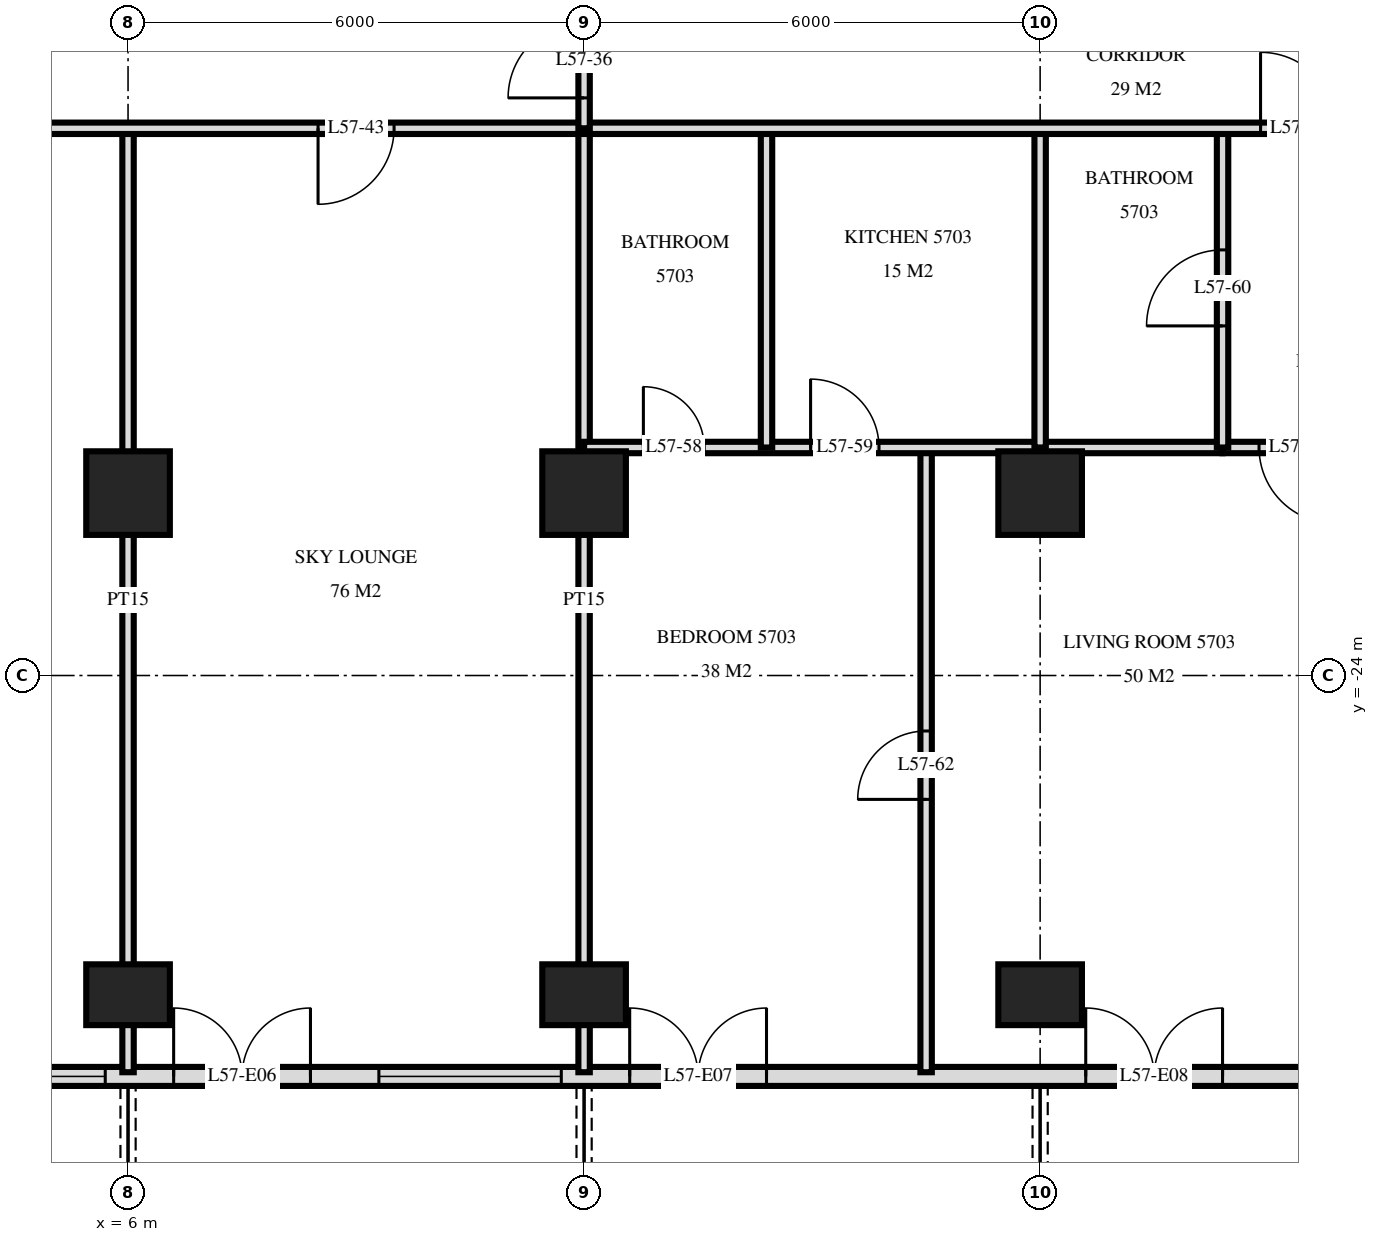
"""IFC4 building model, lengths in metres.
Left out: names, types, materials, properties, quantities, classifications, styles, units other than length and angle.
Written with IfcOpenShell. Run it as: python <this file> out.ifc"""

import sys

from ifc_helpers import new_model, si_unit, direction, frame, frame_2d, origin, origin_2d, place, context, subcontext, project, spatial, rectangle, extrude, element, fill, save


model = new_model("IFC4")
c1 = context("Model", 3, precision=1e-05, world=origin(), true_north=direction((0.0, 1.0)))
c2 = subcontext(c1, "Body", "Model", "MODEL_VIEW")
j1 = project(units=[si_unit("LENGTHUNIT", "METRE"), si_unit("PLANEANGLEUNIT", "RADIAN")], contexts=[c1])
p1 = place(None, origin())
s1 = spatial("IfcSite", under=j1, at=p1, CompositionType="ELEMENT")
p2 = place(p1, origin())
s2 = spatial("IfcBuilding", under=s1, at=p2, CompositionType="ELEMENT")
p3 = place(p2, frame((0.0, 0.0, 218.6)))
s3 = spatial("IfcBuildingStorey", under=s2, at=p3, CompositionType="ELEMENT", Elevation=218.6)
p4 = place(p3, frame((6.0, -28.2, 0.0), z_axis=(0.0, 0.0, 1.0), x_axis=(1.0, 0.0, 0.0)))
e1 = element("IfcColumn", 1, at=p4, inside=s3, PredefinedType="COLUMN", context=c2, shape_type="SweptSolid", body=[
    extrude(rectangle(XDim=1.1, YDim=0.8, at=origin_2d()), origin(), (0.0, 0.0, 1.0), 3.5),
])
p5 = place(p3, frame((6.0, -21.6, 0.0), z_axis=(0.0, 0.0, 1.0), x_axis=(1.0, 0.0, 0.0)))
e2 = element("IfcColumn", 2, at=p5, inside=s3, PredefinedType="COLUMN", context=c2, shape_type="SweptSolid", body=[
    extrude(rectangle(XDim=1.1, YDim=1.1, at=origin_2d()), origin(), (0.0, 0.0, 1.0), 3.5),
])
p6 = place(p3, frame((12.0, -28.2, 0.0), z_axis=(0.0, 0.0, 1.0), x_axis=(1.0, 0.0, 0.0)))
e3 = element("IfcColumn", 3, at=p6, inside=s3, PredefinedType="COLUMN", context=c2, shape_type="SweptSolid", body=[
    extrude(rectangle(XDim=1.1, YDim=0.8, at=origin_2d()), origin(), (0.0, 0.0, 1.0), 3.5),
])
p7 = place(p3, frame((12.0, -21.6, 0.0), z_axis=(0.0, 0.0, 1.0), x_axis=(1.0, 0.0, 0.0)))
e4 = element("IfcColumn", 4, at=p7, inside=s3, PredefinedType="COLUMN", context=c2, shape_type="SweptSolid", body=[
    extrude(rectangle(XDim=1.1, YDim=1.1, at=origin_2d()), origin(), (0.0, 0.0, 1.0), 3.5),
])
p8 = place(p3, frame((18.0, -28.2, 0.0), z_axis=(0.0, 0.0, 1.0), x_axis=(1.0, 0.0, 0.0)))
e5 = element("IfcColumn", 5, at=p8, inside=s3, PredefinedType="COLUMN", context=c2, shape_type="SweptSolid", body=[
    extrude(rectangle(XDim=1.1, YDim=0.8, at=origin_2d()), origin(), (0.0, 0.0, 1.0), 3.5),
])
p9 = place(p3, frame((18.0, -21.6, 0.0), z_axis=(0.0, 0.0, 1.0), x_axis=(1.0, 0.0, 0.0)))
e6 = element("IfcColumn", 6, at=p9, inside=s3, PredefinedType="COLUMN", context=c2, shape_type="SweptSolid", body=[
    extrude(rectangle(XDim=1.1, YDim=1.1, at=origin_2d()), origin(), (0.0, 0.0, 1.0), 3.5),
])
p10 = place(p3, frame((-22.475, -29.275, 0.0), z_axis=(0.0, 0.0, 1.0), x_axis=(1.0, 0.0, 0.0)))
e7 = element("IfcWall", 7, at=p10, inside=s3, PredefinedType="SOLIDWALL", context=c2, shape_type="SweptSolid", body=[
    extrude(rectangle(XDim=44.951, YDim=0.25, at=frame_2d((22.475, 0.0))), origin(), (0.0, 0.0, 1.0), 3.22),
])
p11 = place(p10, frame((0.575, 0.0, 0.0)))
e8 = element("IfcOpeningElement", 8, at=p11, cuts=e7, PredefinedType="OPENING", context=c2, shape_type="SweptSolid", body=[
    extrude(rectangle(XDim=1.8, YDim=2.4, at=frame_2d((0.9, 1.2))), frame((0.0, 0.135, 0.0), z_axis=(0.0, -1.0, 0.0), x_axis=(1.0, 0.0, 0.0)), (0.0, 0.0, 1.0), 0.27),
])
p12 = place(p10, frame((4.775, 0.0, 0.9)))
e9 = element("IfcOpeningElement", 9, at=p12, cuts=e7, PredefinedType="OPENING", context=c2, shape_type="SweptSolid", body=[
    extrude(rectangle(XDim=2.4, YDim=1.5, at=frame_2d((1.2, 0.75))), frame((0.0, 0.135, 0.0), z_axis=(0.0, -1.0, 0.0), x_axis=(1.0, 0.0, 0.0)), (0.0, 0.0, 1.0), 0.27),
])
p13 = place(p10, frame((8.075, 0.0, 0.0)))
e10 = element("IfcOpeningElement", 10, at=p13, cuts=e7, PredefinedType="OPENING", context=c2, shape_type="SweptSolid", body=[
    extrude(rectangle(XDim=1.8, YDim=2.4, at=frame_2d((0.9, 1.2))), frame((0.0, 0.135, 0.0), z_axis=(0.0, -1.0, 0.0), x_axis=(1.0, 0.0, 0.0)), (0.0, 0.0, 1.0), 0.27),
])
p14 = place(p10, frame((11.075, 0.0, 0.0)))
e11 = element("IfcOpeningElement", 11, at=p14, cuts=e7, PredefinedType="OPENING", context=c2, shape_type="SweptSolid", body=[
    extrude(rectangle(XDim=1.8, YDim=2.4, at=frame_2d((0.9, 1.2))), frame((0.0, 0.135, 0.0), z_axis=(0.0, -1.0, 0.0), x_axis=(1.0, 0.0, 0.0)), (0.0, 0.0, 1.0), 0.27),
])
p15 = place(p10, frame((13.775, 0.0, 0.9)))
e12 = element("IfcOpeningElement", 12, at=p15, cuts=e7, PredefinedType="OPENING", context=c2, shape_type="SweptSolid", body=[
    extrude(rectangle(XDim=2.4, YDim=1.5, at=frame_2d((1.2, 0.75))), frame((0.0, 0.135, 0.0), z_axis=(0.0, -1.0, 0.0), x_axis=(1.0, 0.0, 0.0)), (0.0, 0.0, 1.0), 0.27),
])
p16 = place(p10, frame((16.775, 0.0, 0.9)))
e13 = element("IfcOpeningElement", 13, at=p16, cuts=e7, PredefinedType="OPENING", context=c2, shape_type="SweptSolid", body=[
    extrude(rectangle(XDim=2.4, YDim=1.5, at=frame_2d((1.2, 0.75))), frame((0.0, 0.135, 0.0), z_axis=(0.0, -1.0, 0.0), x_axis=(1.0, 0.0, 0.0)), (0.0, 0.0, 1.0), 0.27),
])
p17 = place(p10, frame((20.075, 0.0, 0.0)))
e14 = element("IfcOpeningElement", 14, at=p17, cuts=e7, PredefinedType="OPENING", context=c2, shape_type="SweptSolid", body=[
    extrude(rectangle(XDim=1.8, YDim=2.4, at=frame_2d((0.9, 1.2))), frame((0.0, 0.135, 0.0), z_axis=(0.0, -1.0, 0.0), x_axis=(1.0, 0.0, 0.0)), (0.0, 0.0, 1.0), 0.27),
])
p18 = place(p10, frame((23.075, 0.0, 0.0)))
e15 = element("IfcOpeningElement", 15, at=p18, cuts=e7, PredefinedType="OPENING", context=c2, shape_type="SweptSolid", body=[
    extrude(rectangle(XDim=1.8, YDim=2.4, at=frame_2d((0.9, 1.2))), frame((0.0, 0.135, 0.0), z_axis=(0.0, -1.0, 0.0), x_axis=(1.0, 0.0, 0.0)), (0.0, 0.0, 1.0), 0.27),
])
p19 = place(p10, frame((25.775, 0.0, 0.9)))
e16 = element("IfcOpeningElement", 16, at=p19, cuts=e7, PredefinedType="OPENING", context=c2, shape_type="SweptSolid", body=[
    extrude(rectangle(XDim=2.4, YDim=1.5, at=frame_2d((1.2, 0.75))), frame((0.0, 0.135, 0.0), z_axis=(0.0, -1.0, 0.0), x_axis=(1.0, 0.0, 0.0)), (0.0, 0.0, 1.0), 0.27),
])
p20 = place(p10, frame((29.075, 0.0, 0.0)))
e17 = element("IfcOpeningElement", 17, at=p20, cuts=e7, PredefinedType="OPENING", context=c2, shape_type="SweptSolid", body=[
    extrude(rectangle(XDim=1.8, YDim=2.4, at=frame_2d((0.9, 1.2))), frame((0.0, 0.135, 0.0), z_axis=(0.0, -1.0, 0.0), x_axis=(1.0, 0.0, 0.0)), (0.0, 0.0, 1.0), 0.27),
])
p21 = place(p10, frame((31.775, 0.0, 0.9)))
e18 = element("IfcOpeningElement", 18, at=p21, cuts=e7, PredefinedType="OPENING", context=c2, shape_type="SweptSolid", body=[
    extrude(rectangle(XDim=2.4, YDim=1.5, at=frame_2d((1.2, 0.75))), frame((0.0, 0.135, 0.0), z_axis=(0.0, -1.0, 0.0), x_axis=(1.0, 0.0, 0.0)), (0.0, 0.0, 1.0), 0.27),
])
p22 = place(p10, frame((35.075, 0.0, 0.0)))
e19 = element("IfcOpeningElement", 19, at=p22, cuts=e7, PredefinedType="OPENING", context=c2, shape_type="SweptSolid", body=[
    extrude(rectangle(XDim=1.8, YDim=2.4, at=frame_2d((0.9, 1.2))), frame((0.0, 0.135, 0.0), z_axis=(0.0, -1.0, 0.0), x_axis=(1.0, 0.0, 0.0)), (0.0, 0.0, 1.0), 0.27),
])
p23 = place(p10, frame((41.075, 0.0, 0.0)))
e20 = element("IfcOpeningElement", 20, at=p23, cuts=e7, PredefinedType="OPENING", context=c2, shape_type="SweptSolid", body=[
    extrude(rectangle(XDim=1.8, YDim=2.4, at=frame_2d((0.9, 1.2))), frame((0.0, 0.135, 0.0), z_axis=(0.0, -1.0, 0.0), x_axis=(1.0, 0.0, 0.0)), (0.0, 0.0, 1.0), 0.27),
])
p24 = place(p3, frame((20.4, -21.0, 0.0), z_axis=(0.0, 0.0, 1.0), x_axis=(0.0, 1.0, 0.0)))
e21 = element("IfcWall", 21, at=p24, inside=s3, PredefinedType="PARTITIONING", context=c2, shape_type="SweptSolid", body=[
    extrude(rectangle(XDim=4.2, YDim=0.15, at=frame_2d((2.1, 0.0))), origin(), (0.0, 0.0, 1.0), 3.22),
])
p25 = place(p24, frame((1.6, 0.0, 0.0)))
e22 = element("IfcOpeningElement", 22, at=p25, cuts=e21, PredefinedType="OPENING", context=c2, shape_type="SweptSolid", body=[
    extrude(rectangle(XDim=1.0, YDim=2.1, at=frame_2d((0.5, 1.05))), frame((0.0, 0.085, 0.0), z_axis=(0.0, -1.0, 0.0), x_axis=(1.0, 0.0, 0.0)), (0.0, 0.0, 1.0), 0.17),
])
p26 = place(p3, frame((18.0, -21.0, 0.0), z_axis=(0.0, 0.0, 1.0), x_axis=(0.0, 1.0, 0.0)))
e23 = element("IfcWall", 23, at=p26, inside=s3, PredefinedType="PARTITIONING", context=c2, shape_type="SweptSolid", body=[
    extrude(rectangle(XDim=4.2, YDim=0.15, at=frame_2d((2.1, 0.0))), origin(), (0.0, 0.0, 1.0), 3.22),
])
p27 = place(p3, frame((16.5, -29.22, 0.0), z_axis=(0.0, 0.0, 1.0), x_axis=(0.0, 1.0, 0.0)))
e24 = element("IfcWall", 24, at=p27, inside=s3, PredefinedType="PARTITIONING", context=c2, shape_type="SweptSolid", body=[
    extrude(rectangle(XDim=8.22, YDim=0.15, at=frame_2d((4.11, 0.0))), origin(), (0.0, 0.0, 1.0), 3.22),
])
p28 = place(p27, frame((3.59, 0.0, 0.0)))
e25 = element("IfcOpeningElement", 25, at=p28, cuts=e24, PredefinedType="OPENING", context=c2, shape_type="SweptSolid", body=[
    extrude(rectangle(XDim=0.9, YDim=2.1, at=frame_2d((0.45, 1.05))), frame((0.0, 0.085, 0.0), z_axis=(0.0, -1.0, 0.0), x_axis=(1.0, 0.0, 0.0)), (0.0, 0.0, 1.0), 0.17),
])
p29 = place(p3, frame((14.4, -21.0, 0.0), z_axis=(0.0, 0.0, 1.0), x_axis=(0.0, 1.0, 0.0)))
e26 = element("IfcWall", 26, at=p29, inside=s3, PredefinedType="PARTITIONING", context=c2, shape_type="SweptSolid", body=[
    extrude(rectangle(XDim=4.2, YDim=0.15, at=frame_2d((2.1, 0.0))), origin(), (0.0, 0.0, 1.0), 3.22),
])
p30 = place(p3, frame((12.0, -16.8, 0.0), z_axis=(0.0, 0.0, 1.0), x_axis=(0.0, 1.0, 0.0)))
e27 = element("IfcWall", 27, at=p30, inside=s3, PredefinedType="PARTITIONING", context=c2, shape_type="SweptSolid", body=[
    extrude(rectangle(XDim=1.75, YDim=0.15, at=frame_2d((0.875, 0.0))), origin(), (0.0, 0.0, 1.0), 3.22),
])
p31 = place(p30, frame((0.4, 0.0, 0.0)))
e28 = element("IfcOpeningElement", 28, at=p31, cuts=e27, PredefinedType="OPENING", context=c2, shape_type="SweptSolid", body=[
    extrude(rectangle(XDim=1.0, YDim=2.1, at=frame_2d((0.5, 1.05))), frame((0.0, 0.085, 0.0), z_axis=(0.0, -1.0, 0.0), x_axis=(1.0, 0.0, 0.0)), (0.0, 0.0, 1.0), 0.17),
])
for number, where, z_axis, x_axis in (
    (29, (12.0, -29.22, 0.0), (0.0, 0.0, 1.0), (0.0, 1.0, 0.0)),
    (30, (6.0, -29.22, 0.0), (0.0, 0.0, 1.0), (0.0, 1.0, 0.0)),
):
    element("IfcWall", number, at=place(p3, frame(where, z_axis=z_axis, x_axis=x_axis)), inside=s3, PredefinedType="PARTITIONING", context=c2, shape_type="SweptSolid", body=[
        extrude(rectangle(XDim=12.42, YDim=0.15, at=frame_2d((6.21, 0.0))), origin(), (0.0, 0.0, 1.0), 3.22),
    ])
p32 = place(p3, frame((20.4, -21.0, 0.0), z_axis=(0.0, 0.0, 1.0), x_axis=(1.0, 0.0, 0.0)))
e31 = element("IfcWall", 31, at=p32, inside=s3, PredefinedType="PARTITIONING", context=c2, shape_type="SweptSolid", body=[
    extrude(rectangle(XDim=2.0, YDim=0.15, at=frame_2d((1.0, 0.0))), origin(), (0.0, 0.0, 1.0), 3.22),
])
p33 = place(p32, frame((0.48, 0.0, 0.0)))
e32 = element("IfcOpeningElement", 32, at=p33, cuts=e31, PredefinedType="OPENING", context=c2, shape_type="SweptSolid", body=[
    extrude(rectangle(XDim=1.0, YDim=2.1, at=frame_2d((0.5, 1.05))), frame((0.0, 0.085, 0.0), z_axis=(0.0, -1.0, 0.0), x_axis=(1.0, 0.0, 0.0)), (0.0, 0.0, 1.0), 0.17),
])
p34 = place(p3, frame((12.0, -21.0, 0.0), z_axis=(0.0, 0.0, 1.0), x_axis=(1.0, 0.0, 0.0)))
e33 = element("IfcWall", 33, at=p34, inside=s3, PredefinedType="PARTITIONING", context=c2, shape_type="SweptSolid", body=[
    extrude(rectangle(XDim=8.4, YDim=0.15, at=frame_2d((4.2, 0.0))), origin(), (0.0, 0.0, 1.0), 3.22),
])
p35 = place(p34, frame((0.78, 0.0, 0.0)))
e34 = element("IfcOpeningElement", 34, at=p35, cuts=e33, PredefinedType="OPENING", context=c2, shape_type="SweptSolid", body=[
    extrude(rectangle(XDim=0.8, YDim=2.1, at=frame_2d((0.4, 1.05))), frame((0.0, 0.085, 0.0), z_axis=(0.0, -1.0, 0.0), x_axis=(1.0, 0.0, 0.0)), (0.0, 0.0, 1.0), 0.17),
])
p36 = place(p34, frame((2.98, 0.0, 0.0)))
e35 = element("IfcOpeningElement", 35, at=p36, cuts=e33, PredefinedType="OPENING", context=c2, shape_type="SweptSolid", body=[
    extrude(rectangle(XDim=0.9, YDim=2.1, at=frame_2d((0.45, 1.05))), frame((0.0, 0.085, 0.0), z_axis=(0.0, -1.0, 0.0), x_axis=(1.0, 0.0, 0.0)), (0.0, 0.0, 1.0), 0.17),
])
p37 = place(p3, frame((-26.82, -16.8, 0.0), z_axis=(0.0, 0.0, 1.0), x_axis=(1.0, 0.0, 0.0)))
e36 = element("IfcWall", 36, at=p37, inside=s3, PredefinedType="PARTITIONING", context=c2, shape_type="SweptSolid", body=[
    extrude(rectangle(XDim=53.64, YDim=0.15, at=frame_2d((26.82, 0.0))), origin(), (0.0, 0.0, 1.0), 3.22),
])
p38 = place(p37, frame((11.17, 0.0, 0.0)))
e37 = element("IfcOpeningElement", 37, at=p38, cuts=e36, PredefinedType="OPENING", context=c2, shape_type="SweptSolid", body=[
    extrude(rectangle(XDim=1.0, YDim=2.1, at=frame_2d((0.5, 1.05))), frame((0.0, 0.085, 0.0), z_axis=(0.0, -1.0, 0.0), x_axis=(1.0, 0.0, 0.0)), (0.0, 0.0, 1.0), 0.17),
])
p39 = place(p37, frame((3.22, 0.0, 0.0)))
e38 = element("IfcOpeningElement", 38, at=p39, cuts=e36, PredefinedType="OPENING", context=c2, shape_type="SweptSolid", body=[
    extrude(rectangle(XDim=1.0, YDim=2.1, at=frame_2d((0.5, 1.05))), frame((0.0, 0.085, 0.0), z_axis=(0.0, -1.0, 0.0), x_axis=(1.0, 0.0, 0.0)), (0.0, 0.0, 1.0), 0.17),
])
p40 = place(p37, frame((5.02, 0.0, 0.0)))
e39 = element("IfcOpeningElement", 39, at=p40, cuts=e36, PredefinedType="OPENING", context=c2, shape_type="SweptSolid", body=[
    extrude(rectangle(XDim=1.0, YDim=2.1, at=frame_2d((0.5, 1.05))), frame((0.0, 0.085, 0.0), z_axis=(0.0, -1.0, 0.0), x_axis=(1.0, 0.0, 0.0)), (0.0, 0.0, 1.0), 0.17),
])
p41 = place(p37, frame((47.72, 0.0, 0.0)))
e40 = element("IfcOpeningElement", 40, at=p41, cuts=e36, PredefinedType="OPENING", context=c2, shape_type="SweptSolid", body=[
    extrude(rectangle(XDim=1.0, YDim=2.1, at=frame_2d((0.5, 1.05))), frame((0.0, 0.085, 0.0), z_axis=(0.0, -1.0, 0.0), x_axis=(1.0, 0.0, 0.0)), (0.0, 0.0, 1.0), 0.17),
])
p42 = place(p37, frame((51.04, 0.0, 0.0)))
e41 = element("IfcOpeningElement", 41, at=p42, cuts=e36, PredefinedType="OPENING", context=c2, shape_type="SweptSolid", body=[
    extrude(rectangle(XDim=1.0, YDim=2.1, at=frame_2d((0.5, 1.05))), frame((0.0, 0.085, 0.0), z_axis=(0.0, -1.0, 0.0), x_axis=(1.0, 0.0, 0.0)), (0.0, 0.0, 1.0), 0.17),
])
p43 = place(p37, frame((17.32, 0.0, 0.0)))
e42 = element("IfcOpeningElement", 42, at=p43, cuts=e36, PredefinedType="OPENING", context=c2, shape_type="SweptSolid", body=[
    extrude(rectangle(XDim=1.0, YDim=2.1, at=frame_2d((0.5, 1.05))), frame((0.0, 0.085, 0.0), z_axis=(0.0, -1.0, 0.0), x_axis=(1.0, 0.0, 0.0)), (0.0, 0.0, 1.0), 0.17),
])
p44 = place(p37, frame((26.32, 0.0, 0.0)))
e43 = element("IfcOpeningElement", 43, at=p44, cuts=e36, PredefinedType="OPENING", context=c2, shape_type="SweptSolid", body=[
    extrude(rectangle(XDim=1.0, YDim=2.1, at=frame_2d((0.5, 1.05))), frame((0.0, 0.085, 0.0), z_axis=(0.0, -1.0, 0.0), x_axis=(1.0, 0.0, 0.0)), (0.0, 0.0, 1.0), 0.17),
])
p45 = place(p37, frame((35.32, 0.0, 0.0)))
e44 = element("IfcOpeningElement", 44, at=p45, cuts=e36, PredefinedType="OPENING", context=c2, shape_type="SweptSolid", body=[
    extrude(rectangle(XDim=1.0, YDim=2.1, at=frame_2d((0.5, 1.05))), frame((0.0, 0.085, 0.0), z_axis=(0.0, -1.0, 0.0), x_axis=(1.0, 0.0, 0.0)), (0.0, 0.0, 1.0), 0.17),
])
p46 = place(p19, origin())
e45 = element("IfcWindow", 45, at=p46, inside=s3, PartitioningType="SINGLE_PANEL", PredefinedType="WINDOW", context=c2, shape_type="SweptSolid", body=[
    extrude(rectangle(XDim=2.4, YDim=1.5, at=frame_2d((1.2, 0.75))), frame((0.0, 0.03, 0.0), z_axis=(0.0, -1.0, 0.0), x_axis=(1.0, 0.0, 0.0)), (0.0, 0.0, 1.0), 0.06),
])
fill(e16, e45)
p47 = place(p20, origin())
e46 = element("IfcDoor", 46, at=p47, inside=s3, OperationType="DOUBLE_DOOR_SINGLE_SWING", PredefinedType="DOOR", context=c2, shape_type="SweptSolid", body=[
    extrude(rectangle(XDim=1.8, YDim=2.4, at=frame_2d((0.9, 1.2))), frame((0.0, 0.025, 0.0), z_axis=(0.0, -1.0, 0.0), x_axis=(1.0, 0.0, 0.0)), (0.0, 0.0, 1.0), 0.05),
])
fill(e17, e46)
p48 = place(p21, origin())
e47 = element("IfcWindow", 47, at=p48, inside=s3, PartitioningType="SINGLE_PANEL", PredefinedType="WINDOW", context=c2, shape_type="SweptSolid", body=[
    extrude(rectangle(XDim=2.4, YDim=1.5, at=frame_2d((1.2, 0.75))), frame((0.0, 0.03, 0.0), z_axis=(0.0, -1.0, 0.0), x_axis=(1.0, 0.0, 0.0)), (0.0, 0.0, 1.0), 0.06),
])
fill(e18, e47)
p49 = place(p22, origin())
e48 = element("IfcDoor", 48, at=p49, inside=s3, OperationType="DOUBLE_DOOR_SINGLE_SWING", PredefinedType="DOOR", context=c2, shape_type="SweptSolid", body=[
    extrude(rectangle(XDim=1.8, YDim=2.4, at=frame_2d((0.9, 1.2))), frame((0.0, 0.025, 0.0), z_axis=(0.0, -1.0, 0.0), x_axis=(1.0, 0.0, 0.0)), (0.0, 0.0, 1.0), 0.05),
])
fill(e19, e48)
p50 = place(p23, origin())
e49 = element("IfcDoor", 49, at=p50, inside=s3, OperationType="DOUBLE_DOOR_SINGLE_SWING", PredefinedType="DOOR", context=c2, shape_type="SweptSolid", body=[
    extrude(rectangle(XDim=1.8, YDim=2.4, at=frame_2d((0.9, 1.2))), frame((0.0, 0.025, 0.0), z_axis=(0.0, -1.0, 0.0), x_axis=(1.0, 0.0, 0.0)), (0.0, 0.0, 1.0), 0.05),
])
fill(e20, e49)
p51 = place(p31, origin())
e50 = element("IfcDoor", 50, at=p51, inside=s3, OperationType="SINGLE_SWING_RIGHT", PredefinedType="DOOR", context=c2, shape_type="SweptSolid", body=[
    extrude(rectangle(XDim=1.0, YDim=2.1, at=frame_2d((0.5, 1.05))), frame((0.0, 0.025, 0.0), z_axis=(0.0, -1.0, 0.0), x_axis=(1.0, 0.0, 0.0)), (0.0, 0.0, 1.0), 0.05),
])
fill(e28, e50)
p52 = place(p41, origin())
e51 = element("IfcDoor", 51, at=p52, inside=s3, OperationType="SINGLE_SWING_RIGHT", PredefinedType="DOOR", context=c2, shape_type="SweptSolid", body=[
    extrude(rectangle(XDim=1.0, YDim=2.1, at=frame_2d((0.5, 1.05))), frame((0.0, 0.025, 0.0), z_axis=(0.0, -1.0, 0.0), x_axis=(1.0, 0.0, 0.0)), (0.0, 0.0, 1.0), 0.05),
])
fill(e40, e51)
p53 = place(p45, frame((0.5, 0.0, 0.0), z_axis=(0.0, 0.0, 1.0), x_axis=(-1.0, 0.0, 0.0)))
e52 = element("IfcDoor", 52, at=p53, inside=s3, OperationType="SINGLE_SWING_LEFT", PredefinedType="DOOR", context=c2, shape_type="SweptSolid", body=[
    extrude(rectangle(XDim=1.0, YDim=2.1, at=frame_2d((0.0, 1.05))), frame((0.0, -0.025, 0.0), z_axis=(0.0, 1.0, 0.0), x_axis=(-1.0, 0.0, 0.0)), (0.0, 0.0, 1.0), 0.05),
])
fill(e44, e52)
p54 = place(p35, origin())
e53 = element("IfcDoor", 53, at=p54, inside=s3, OperationType="SINGLE_SWING_RIGHT", PredefinedType="DOOR", context=c2, shape_type="SweptSolid", body=[
    extrude(rectangle(XDim=0.8, YDim=2.1, at=frame_2d((0.4, 1.05))), frame((0.0, 0.025, 0.0), z_axis=(0.0, -1.0, 0.0), x_axis=(1.0, 0.0, 0.0)), (0.0, 0.0, 1.0), 0.05),
])
fill(e34, e53)
p55 = place(p36, origin())
e54 = element("IfcDoor", 54, at=p55, inside=s3, OperationType="SINGLE_SWING_RIGHT", PredefinedType="DOOR", context=c2, shape_type="SweptSolid", body=[
    extrude(rectangle(XDim=0.9, YDim=2.1, at=frame_2d((0.45, 1.05))), frame((0.0, 0.025, 0.0), z_axis=(0.0, -1.0, 0.0), x_axis=(1.0, 0.0, 0.0)), (0.0, 0.0, 1.0), 0.05),
])
fill(e35, e54)
p56 = place(p25, origin())
e55 = element("IfcDoor", 55, at=p56, inside=s3, OperationType="SINGLE_SWING_RIGHT", PredefinedType="DOOR", context=c2, shape_type="SweptSolid", body=[
    extrude(rectangle(XDim=1.0, YDim=2.1, at=frame_2d((0.5, 1.05))), frame((0.0, 0.025, 0.0), z_axis=(0.0, -1.0, 0.0), x_axis=(1.0, 0.0, 0.0)), (0.0, 0.0, 1.0), 0.05),
])
fill(e22, e55)
p57 = place(p33, frame((0.5, 0.0, 0.0), z_axis=(0.0, 0.0, 1.0), x_axis=(-1.0, 0.0, 0.0)))
e56 = element("IfcDoor", 56, at=p57, inside=s3, OperationType="SINGLE_SWING_RIGHT", PredefinedType="DOOR", context=c2, shape_type="SweptSolid", body=[
    extrude(rectangle(XDim=1.0, YDim=2.1, at=frame_2d((0.0, 1.05))), frame((0.0, -0.025, 0.0), z_axis=(0.0, 1.0, 0.0), x_axis=(-1.0, 0.0, 0.0)), (0.0, 0.0, 1.0), 0.05),
])
fill(e32, e56)
p58 = place(p28, origin())
e57 = element("IfcDoor", 57, at=p58, inside=s3, OperationType="SINGLE_SWING_RIGHT", PredefinedType="DOOR", context=c2, shape_type="SweptSolid", body=[
    extrude(rectangle(XDim=0.9, YDim=2.1, at=frame_2d((0.45, 1.05))), frame((0.0, 0.025, 0.0), z_axis=(0.0, -1.0, 0.0), x_axis=(1.0, 0.0, 0.0)), (0.0, 0.0, 1.0), 0.05),
])
fill(e25, e57)
save(model, sys.argv[1])
